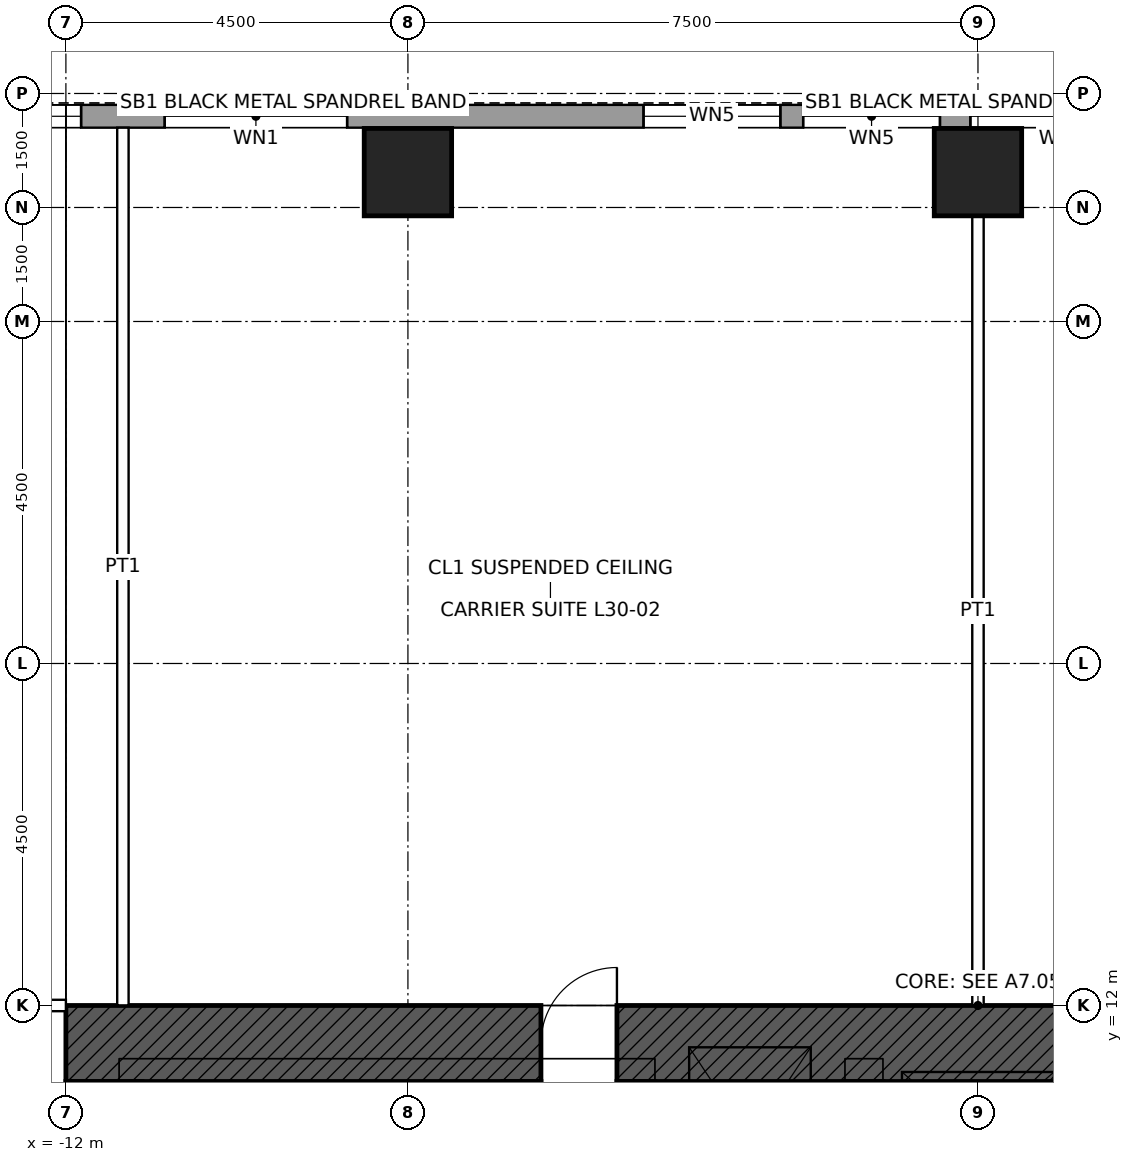
"""IFC4 building model, lengths in metres.
Left out: names, types, materials, properties, quantities, classifications, styles, units other than length and angle.
Written with IfcOpenShell. Run it as: python <this file> out.ifc"""

import sys

from ifc_helpers import new_model, si_unit, direction, frame, frame_2d, origin, origin_2d, place, context, subcontext, project, spatial, rectangle, hollow_rectangle, extrude, element, fill, save


model = new_model("IFC4")
c1 = context("Model", 3, precision=1e-05, world=origin(), true_north=direction((0.0, 1.0)))
c2 = subcontext(c1, "Body", "Model", "MODEL_VIEW")
j1 = project(units=[si_unit("LENGTHUNIT", "METRE"), si_unit("PLANEANGLEUNIT", "RADIAN")], contexts=[c1])
p1 = place(None, origin())
s1 = spatial("IfcSite", under=j1, at=p1, CompositionType="ELEMENT")
p2 = place(p1, origin())
s2 = spatial("IfcBuilding", under=s1, at=p2, CompositionType="ELEMENT")
p3 = place(p2, frame((0.0, 0.0, 149.4)))
s3 = spatial("IfcBuildingStorey", under=s2, at=p3, CompositionType="ELEMENT", Elevation=149.4)
for number, where, z_axis, x_axis in (
    (1, (-7.5, 22.965, 0.0), (0.0, 0.0, 1.0), (1.0, 0.0, 0.0)),
    (2, (0.0, 22.965, 0.0), (0.0, 0.0, 1.0), (1.0, 0.0, 0.0)),
):
    element("IfcColumn", number, at=place(p3, frame(where, z_axis=z_axis, x_axis=x_axis)), inside=s3, PredefinedType="COLUMN", context=c2, shape_type="SweptSolid", body=[
        extrude(hollow_rectangle(XDim=1.15, YDim=1.15, WallThickness=0.075, at=origin_2d()), origin(), (0.0, 0.0, 1.0), 4.5),
    ])
p4 = place(p3, frame((-12.0, 11.5, 0.0), z_axis=(0.0, 0.0, 1.0), x_axis=(1.0, 0.0, 0.0)))
e3 = element("IfcWall", 3, at=p4, inside=s3, PredefinedType="SHEAR", context=c2, shape_type="SweptSolid", body=[
    extrude(rectangle(XDim=24.0, YDim=1.0, at=frame_2d((12.0, 0.0))), origin(), (0.0, 0.0, 1.0), 4.5),
])
p5 = place(p4, frame((6.25, 0.0, 0.0)))
e4 = element("IfcOpeningElement", 4, at=p5, cuts=e3, PredefinedType="OPENING", context=c2, shape_type="SweptSolid", body=[
    extrude(rectangle(XDim=1.0, YDim=2.4, at=frame_2d((0.5, 1.2))), frame((0.0, 0.51, 0.0), z_axis=(0.0, -1.0, 0.0), x_axis=(1.0, 0.0, 0.0)), (0.0, 0.0, 1.0), 1.02),
])
p6 = place(p4, frame((16.75, 0.0, 0.0)))
e5 = element("IfcOpeningElement", 5, at=p6, cuts=e3, PredefinedType="OPENING", context=c2, shape_type="SweptSolid", body=[
    extrude(rectangle(XDim=1.0, YDim=2.4, at=frame_2d((0.5, 1.2))), frame((0.0, 0.51, 0.0), z_axis=(0.0, -1.0, 0.0), x_axis=(1.0, 0.0, 0.0)), (0.0, 0.0, 1.0), 1.02),
])
p7 = place(p3, frame((-16.2, 23.7, 0.0), z_axis=(0.0, 0.0, 1.0), x_axis=(1.0, 0.0, 0.0)))
e6 = element("IfcWall", 6, at=p7, inside=s3, PredefinedType="SOLIDWALL", context=c2, shape_type="SweptSolid", body=[
    extrude(rectangle(XDim=32.4, YDim=0.3, at=frame_2d((16.2, 0.0))), origin(), (0.0, 0.0, 1.0), 4.3),
])
p8 = place(p7, frame((2.0, 0.0, 1.0)))
e7 = element("IfcOpeningElement", 7, at=p8, cuts=e6, PredefinedType="OPENING", context=c2, shape_type="SweptSolid", body=[
    extrude(rectangle(XDim=2.4, YDim=1.2, at=frame_2d((1.2, 0.6))), frame((0.0, 0.16, 0.0), z_axis=(0.0, -1.0, 0.0), x_axis=(1.0, 0.0, 0.0)), (0.0, 0.0, 1.0), 0.32),
])
p9 = place(p7, frame((5.5, 0.0, 1.0)))
e8 = element("IfcOpeningElement", 8, at=p9, cuts=e6, PredefinedType="OPENING", context=c2, shape_type="SweptSolid", body=[
    extrude(rectangle(XDim=2.4, YDim=1.2, at=frame_2d((1.2, 0.6))), frame((0.0, 0.16, 0.0), z_axis=(0.0, -1.0, 0.0), x_axis=(1.0, 0.0, 0.0)), (0.0, 0.0, 1.0), 0.32),
])
p10 = place(p7, frame((11.8, 0.0, 1.0)))
e9 = element("IfcOpeningElement", 9, at=p10, cuts=e6, PredefinedType="OPENING", context=c2, shape_type="SweptSolid", body=[
    extrude(rectangle(XDim=1.8, YDim=1.2, at=frame_2d((0.9, 0.6))), frame((0.0, 0.16, 0.0), z_axis=(0.0, -1.0, 0.0), x_axis=(1.0, 0.0, 0.0)), (0.0, 0.0, 1.0), 0.32),
])
p11 = place(p7, frame((13.9, 0.0, 1.0)))
e10 = element("IfcOpeningElement", 10, at=p11, cuts=e6, PredefinedType="OPENING", context=c2, shape_type="SweptSolid", body=[
    extrude(rectangle(XDim=1.8, YDim=1.2, at=frame_2d((0.9, 0.6))), frame((0.0, 0.16, 0.0), z_axis=(0.0, -1.0, 0.0), x_axis=(1.0, 0.0, 0.0)), (0.0, 0.0, 1.0), 0.32),
])
p12 = place(p7, frame((16.1, 0.0, 1.0)))
e11 = element("IfcOpeningElement", 11, at=p12, cuts=e6, PredefinedType="OPENING", context=c2, shape_type="SweptSolid", body=[
    extrude(rectangle(XDim=2.4, YDim=1.2, at=frame_2d((1.2, 0.6))), frame((0.0, 0.16, 0.0), z_axis=(0.0, -1.0, 0.0), x_axis=(1.0, 0.0, 0.0)), (0.0, 0.0, 1.0), 0.32),
])
p13 = place(p7, frame((18.8, 0.0, 1.0)))
e12 = element("IfcOpeningElement", 12, at=p13, cuts=e6, PredefinedType="OPENING", context=c2, shape_type="SweptSolid", body=[
    extrude(rectangle(XDim=1.8, YDim=1.2, at=frame_2d((0.9, 0.6))), frame((0.0, 0.16, 0.0), z_axis=(0.0, -1.0, 0.0), x_axis=(1.0, 0.0, 0.0)), (0.0, 0.0, 1.0), 0.32),
])
p14 = place(p7, frame((24.5, 0.0, 1.0)))
e13 = element("IfcOpeningElement", 13, at=p14, cuts=e6, PredefinedType="OPENING", context=c2, shape_type="SweptSolid", body=[
    extrude(rectangle(XDim=2.4, YDim=1.2, at=frame_2d((1.2, 0.6))), frame((0.0, 0.16, 0.0), z_axis=(0.0, -1.0, 0.0), x_axis=(1.0, 0.0, 0.0)), (0.0, 0.0, 1.0), 0.32),
])
p15 = place(p7, frame((28.0, 0.0, 1.0)))
e14 = element("IfcOpeningElement", 14, at=p15, cuts=e6, PredefinedType="OPENING", context=c2, shape_type="SweptSolid", body=[
    extrude(rectangle(XDim=2.4, YDim=1.2, at=frame_2d((1.2, 0.6))), frame((0.0, 0.16, 0.0), z_axis=(0.0, -1.0, 0.0), x_axis=(1.0, 0.0, 0.0)), (0.0, 0.0, 1.0), 0.32),
])
p16 = place(p3, frame((-14.075, 12.0, 0.0), z_axis=(0.0, 0.0, 1.0), x_axis=(1.0, 0.0, 0.0)))
e15 = element("IfcWall", 15, at=p16, inside=s3, PredefinedType="PARTITIONING", context=c2, shape_type="SweptSolid", body=[
    extrude(rectangle(XDim=2.075, YDim=0.15, at=frame_2d((1.038, 0.0))), origin(), (0.0, 0.0, 1.0), 4.3),
])
p17 = place(p16, frame((0.575, 0.0, 0.0)))
e16 = element("IfcOpeningElement", 16, at=p17, cuts=e15, PredefinedType="OPENING", context=c2, shape_type="SweptSolid", body=[
    extrude(rectangle(XDim=1.0, YDim=2.1, at=frame_2d((0.5, 1.05))), frame((0.0, 0.085, 0.0), z_axis=(0.0, -1.0, 0.0), x_axis=(1.0, 0.0, 0.0)), (0.0, 0.0, 1.0), 0.17),
])
p18 = place(p3, frame((-11.25, 12.0, 0.0), z_axis=(0.0, 0.0, 1.0), x_axis=(0.0, 1.0, 0.0)))
e17 = element("IfcWall", 17, at=p18, inside=s3, PredefinedType="PARTITIONING", context=c2, shape_type="SweptSolid", body=[
    extrude(rectangle(XDim=11.55, YDim=0.15, at=frame_2d((5.775, 0.0))), origin(), (0.0, 0.0, 1.0), 3.431),
])
p19 = place(p3, frame((0.0, 12.0, 0.0), z_axis=(0.0, 0.0, 1.0), x_axis=(0.0, 1.0, 0.0)))
e18 = element("IfcWall", 18, at=p19, inside=s3, PredefinedType="PARTITIONING", context=c2, shape_type="SweptSolid", body=[
    extrude(rectangle(XDim=10.39, YDim=0.15, at=frame_2d((5.195, 0.0))), origin(), (0.0, 0.0, 1.0), 3.431),
])
p20 = place(p8, origin())
e19 = element("IfcWindow", 19, at=p20, inside=s3, PartitioningType="SINGLE_PANEL", PredefinedType="WINDOW", context=c2, shape_type="SweptSolid", body=[
    extrude(rectangle(XDim=2.4, YDim=1.2, at=frame_2d((1.2, 0.6))), frame((0.0, 0.03, 0.0), z_axis=(0.0, -1.0, 0.0), x_axis=(1.0, 0.0, 0.0)), (0.0, 0.0, 1.0), 0.06),
])
fill(e7, e19)
p21 = place(p9, origin())
e20 = element("IfcWindow", 20, at=p21, inside=s3, PartitioningType="SINGLE_PANEL", PredefinedType="WINDOW", context=c2, shape_type="SweptSolid", body=[
    extrude(rectangle(XDim=2.4, YDim=1.2, at=frame_2d((1.2, 0.6))), frame((0.0, 0.03, 0.0), z_axis=(0.0, -1.0, 0.0), x_axis=(1.0, 0.0, 0.0)), (0.0, 0.0, 1.0), 0.06),
])
fill(e8, e20)
p22 = place(p10, origin())
e21 = element("IfcWindow", 21, at=p22, inside=s3, PartitioningType="SINGLE_PANEL", PredefinedType="WINDOW", context=c2, shape_type="SweptSolid", body=[
    extrude(rectangle(XDim=1.8, YDim=1.2, at=frame_2d((0.9, 0.6))), frame((0.0, 0.03, 0.0), z_axis=(0.0, -1.0, 0.0), x_axis=(1.0, 0.0, 0.0)), (0.0, 0.0, 1.0), 0.06),
])
fill(e9, e21)
p23 = place(p11, origin())
e22 = element("IfcWindow", 22, at=p23, inside=s3, PartitioningType="SINGLE_PANEL", PredefinedType="WINDOW", context=c2, shape_type="SweptSolid", body=[
    extrude(rectangle(XDim=1.8, YDim=1.2, at=frame_2d((0.9, 0.6))), frame((0.0, 0.03, 0.0), z_axis=(0.0, -1.0, 0.0), x_axis=(1.0, 0.0, 0.0)), (0.0, 0.0, 1.0), 0.06),
])
fill(e10, e22)
p24 = place(p12, origin())
e23 = element("IfcWindow", 23, at=p24, inside=s3, PartitioningType="SINGLE_PANEL", PredefinedType="WINDOW", context=c2, shape_type="SweptSolid", body=[
    extrude(rectangle(XDim=2.4, YDim=1.2, at=frame_2d((1.2, 0.6))), frame((0.0, 0.03, 0.0), z_axis=(0.0, -1.0, 0.0), x_axis=(1.0, 0.0, 0.0)), (0.0, 0.0, 1.0), 0.06),
])
fill(e11, e23)
p25 = place(p5, origin())
e24 = element("IfcDoor", 24, at=p25, inside=s3, OperationType="SINGLE_SWING_RIGHT", PredefinedType="DOOR", context=c2, shape_type="SweptSolid", body=[
    extrude(rectangle(XDim=1.0, YDim=2.4, at=frame_2d((0.5, 1.2))), frame((0.0, 0.485, 0.0), z_axis=(0.0, -1.0, 0.0), x_axis=(1.0, 0.0, 0.0)), (0.0, 0.0, 1.0), 0.05),
])
fill(e4, e24)
save(model, sys.argv[1])
